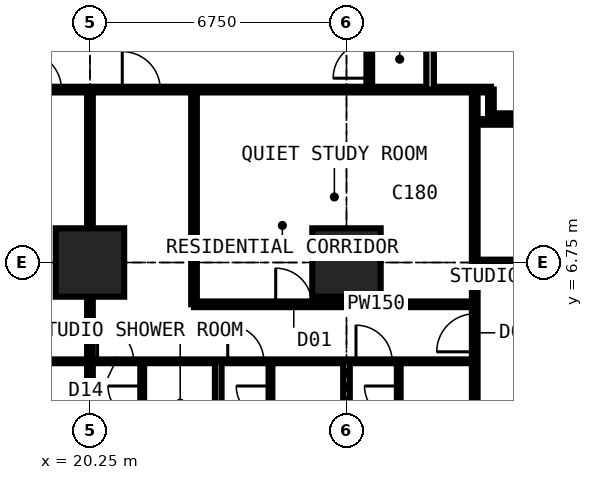
"""IFC4 building model, lengths in metres.
Left out: names, types, materials, properties, quantities, classifications, styles, units other than length and angle.
Written with IfcOpenShell. Run it as: python <this file> out.ifc"""

import sys

from ifc_helpers import new_model, si_unit, direction, frame, frame_2d, origin, origin_2d, place, context, subcontext, project, spatial, rectangle, extrude, element, fill, save


model = new_model("IFC4")
c1 = context("Model", 3, precision=1e-05, world=origin(), true_north=direction((0.0, 1.0)))
c2 = subcontext(c1, "Body", "Model", "MODEL_VIEW")
j1 = project(units=[si_unit("LENGTHUNIT", "METRE"), si_unit("PLANEANGLEUNIT", "RADIAN")], contexts=[c1])
p1 = place(None, origin())
s1 = spatial("IfcSite", under=j1, at=p1, CompositionType="ELEMENT")
p2 = place(p1, origin())
s2 = spatial("IfcBuilding", under=s1, at=p2, CompositionType="ELEMENT")
p3 = place(p2, frame((0.0, 0.0, 64.8)))
s3 = spatial("IfcBuildingStorey", under=s2, at=p3, CompositionType="ELEMENT", Elevation=64.8)
for number, where, z_axis, x_axis in (
    (1, (20.25, 6.75, 0.0), (0.0, 0.0, 1.0), (1.0, 0.0, 0.0)),
    (2, (27.0, 6.75, 0.0), (0.0, 0.0, 1.0), (1.0, 0.0, 0.0)),
):
    element("IfcColumn", number, at=place(p3, frame(where, z_axis=z_axis, x_axis=x_axis)), inside=s3, PredefinedType="COLUMN", context=c2, shape_type="SweptSolid", body=[
        extrude(rectangle(XDim=1.8, YDim=1.8, at=origin_2d()), origin(), (0.0, 0.0, 1.0), 3.6),
    ])
p4 = place(p3, frame((6.75, 4.15, 0.0), z_axis=(0.0, 0.0, 1.0), x_axis=(1.0, 0.0, 0.0)))
e3 = element("IfcWall", 3, at=p4, inside=s3, PredefinedType="PARTITIONING", context=c2, shape_type="SweptSolid", body=[
    extrude(rectangle(XDim=23.625, YDim=0.1, at=frame_2d((11.812, 0.0))), origin(), (0.0, 0.0, 1.0), 3.375),
])
p5 = place(p4, frame((1.2, 0.0, 0.0)))
e4 = element("IfcOpeningElement", 4, at=p5, cuts=e3, PredefinedType="OPENING", context=c2, shape_type="SweptSolid", body=[
    extrude(rectangle(XDim=1.0, YDim=2.2, at=frame_2d((0.5, 1.1))), frame((0.0, 0.06, 0.0), z_axis=(0.0, -1.0, 0.0), x_axis=(1.0, 0.0, 0.0)), (0.0, 0.0, 1.0), 0.12),
])
p6 = place(p4, frame((3.575, 0.0, 0.0)))
e5 = element("IfcOpeningElement", 5, at=p6, cuts=e3, PredefinedType="OPENING", context=c2, shape_type="SweptSolid", body=[
    extrude(rectangle(XDim=0.95, YDim=2.2, at=frame_2d((0.475, 1.1))), frame((0.0, 0.06, 0.0), z_axis=(0.0, -1.0, 0.0), x_axis=(1.0, 0.0, 0.0)), (0.0, 0.0, 1.0), 0.12),
])
p7 = place(p4, frame((7.0, 0.0, 0.0)))
e6 = element("IfcOpeningElement", 6, at=p7, cuts=e3, PredefinedType="OPENING", context=c2, shape_type="SweptSolid", body=[
    extrude(rectangle(XDim=0.95, YDim=2.2, at=frame_2d((0.475, 1.1))), frame((0.0, 0.06, 0.0), z_axis=(0.0, -1.0, 0.0), x_axis=(1.0, 0.0, 0.0)), (0.0, 0.0, 1.0), 0.12),
])
p8 = place(p4, frame((10.375, 0.0, 0.0)))
e7 = element("IfcOpeningElement", 7, at=p8, cuts=e3, PredefinedType="OPENING", context=c2, shape_type="SweptSolid", body=[
    extrude(rectangle(XDim=0.95, YDim=2.2, at=frame_2d((0.475, 1.1))), frame((0.0, 0.06, 0.0), z_axis=(0.0, -1.0, 0.0), x_axis=(1.0, 0.0, 0.0)), (0.0, 0.0, 1.0), 0.12),
])
p9 = place(p4, frame((13.7, 0.0, 0.0)))
e8 = element("IfcOpeningElement", 8, at=p9, cuts=e3, PredefinedType="OPENING", context=c2, shape_type="SweptSolid", body=[
    extrude(rectangle(XDim=0.95, YDim=2.2, at=frame_2d((0.475, 1.1))), frame((0.0, 0.06, 0.0), z_axis=(0.0, -1.0, 0.0), x_axis=(1.0, 0.0, 0.0)), (0.0, 0.0, 1.0), 0.12),
])
p10 = place(p4, frame((17.125, 0.0, 0.0)))
e9 = element("IfcOpeningElement", 9, at=p10, cuts=e3, PredefinedType="OPENING", context=c2, shape_type="SweptSolid", body=[
    extrude(rectangle(XDim=0.95, YDim=2.2, at=frame_2d((0.475, 1.1))), frame((0.0, 0.06, 0.0), z_axis=(0.0, -1.0, 0.0), x_axis=(1.0, 0.0, 0.0)), (0.0, 0.0, 1.0), 0.12),
])
p11 = place(p4, frame((20.5, 0.0, 0.0)))
e10 = element("IfcOpeningElement", 10, at=p11, cuts=e3, PredefinedType="OPENING", context=c2, shape_type="SweptSolid", body=[
    extrude(rectangle(XDim=0.95, YDim=2.2, at=frame_2d((0.475, 1.1))), frame((0.0, 0.06, 0.0), z_axis=(0.0, -1.0, 0.0), x_axis=(1.0, 0.0, 0.0)), (0.0, 0.0, 1.0), 0.12),
])
p12 = place(p3, frame((10.125, 11.3, 0.0), z_axis=(0.0, 0.0, 1.0), x_axis=(1.0, 0.0, 0.0)))
e11 = element("IfcWall", 11, at=p12, inside=s3, PredefinedType="PARTITIONING", context=c2, shape_type="SweptSolid", body=[
    extrude(rectangle(XDim=20.675, YDim=0.15, at=frame_2d((10.337, 0.0))), origin(), (0.0, 0.0, 1.0), 3.375),
])
p13 = place(p12, frame((8.375, 0.0, 0.0)))
e12 = element("IfcOpeningElement", 12, at=p13, cuts=e11, PredefinedType="OPENING", context=c2, shape_type="SweptSolid", body=[
    extrude(rectangle(XDim=1.0, YDim=2.2, at=frame_2d((0.5, 1.1))), frame((0.0, 0.085, 0.0), z_axis=(0.0, -1.0, 0.0), x_axis=(1.0, 0.0, 0.0)), (0.0, 0.0, 1.0), 0.17),
])
p14 = place(p12, frame((10.975, 0.0, 0.0)))
e13 = element("IfcOpeningElement", 13, at=p14, cuts=e11, PredefinedType="OPENING", context=c2, shape_type="SweptSolid", body=[
    extrude(rectangle(XDim=1.0, YDim=2.2, at=frame_2d((0.5, 1.1))), frame((0.0, 0.085, 0.0), z_axis=(0.0, -1.0, 0.0), x_axis=(1.0, 0.0, 0.0)), (0.0, 0.0, 1.0), 0.17),
])
p15 = place(p12, frame((3.925, 0.0, 0.0)))
e14 = element("IfcOpeningElement", 14, at=p15, cuts=e11, PredefinedType="OPENING", context=c2, shape_type="SweptSolid", body=[
    extrude(rectangle(XDim=0.95, YDim=2.2, at=frame_2d((0.475, 1.1))), frame((0.0, 0.085, 0.0), z_axis=(0.0, -1.0, 0.0), x_axis=(1.0, 0.0, 0.0)), (0.0, 0.0, 1.0), 0.17),
])
p16 = place(p3, frame((20.25, -0.734, 0.0), z_axis=(0.0, 0.0, 1.0), x_axis=(0.0, 1.0, 0.0)))
e15 = element("IfcWall", 15, at=p16, inside=s3, PredefinedType="PARTITIONING", context=c2, shape_type="SweptSolid", body=[
    extrude(rectangle(XDim=12.034, YDim=0.15, at=frame_2d((6.017, 0.0))), origin(), (0.0, 0.0, 1.0), 2.61),
])
p17 = place(p3, frame((21.625, 1.95, 0.0), z_axis=(0.0, 0.0, 1.0), x_axis=(0.0, 1.0, 0.0)))
e16 = element("IfcWall", 16, at=p17, inside=s3, PredefinedType="PARTITIONING", context=c2, shape_type="SweptSolid", body=[
    extrude(rectangle(XDim=2.2, YDim=0.1, at=frame_2d((1.1, 0.0))), origin(), (0.0, 0.0, 1.0), 3.375),
])
p18 = place(p17, frame((0.65, 0.0, 0.0)))
e17 = element("IfcOpeningElement", 17, at=p18, cuts=e16, PredefinedType="OPENING", context=c2, shape_type="SweptSolid", body=[
    extrude(rectangle(XDim=0.9, YDim=2.2, at=frame_2d((0.45, 1.1))), frame((0.0, 0.06, 0.0), z_axis=(0.0, -1.0, 0.0), x_axis=(1.0, 0.0, 0.0)), (0.0, 0.0, 1.0), 0.12),
])
p19 = place(p3, frame((22.988, 5.65, 0.0), z_axis=(0.0, 0.0, 1.0), x_axis=(1.0, 0.0, 0.0)))
e18 = element("IfcWall", 18, at=p19, inside=s3, PredefinedType="PARTITIONING", context=c2, shape_type="SweptSolid", body=[
    extrude(rectangle(XDim=7.387, YDim=0.15, at=frame_2d((3.694, 0.0))), origin(), (0.0, 0.0, 1.0), 3.375),
])
p20 = place(p19, frame((2.15, 0.0, 0.0)))
e19 = element("IfcOpeningElement", 19, at=p20, cuts=e18, PredefinedType="OPENING", context=c2, shape_type="SweptSolid", body=[
    extrude(rectangle(XDim=0.95, YDim=2.2, at=frame_2d((0.475, 1.1))), frame((0.0, 0.085, 0.0), z_axis=(0.0, -1.0, 0.0), x_axis=(1.0, 0.0, 0.0)), (0.0, 0.0, 1.0), 0.17),
])
p21 = place(p3, frame((22.988, 5.65, 0.0), z_axis=(0.0, 0.0, 1.0), x_axis=(0.0, 1.0, 0.0)))
e20 = element("IfcWall", 20, at=p21, inside=s3, PredefinedType="PARTITIONING", context=c2, shape_type="SweptSolid", body=[
    extrude(rectangle(XDim=5.65, YDim=0.15, at=frame_2d((2.825, 0.0))), origin(), (0.0, 0.0, 1.0), 3.375),
])
p22 = place(p3, frame((23.625, -0.734, 0.0), z_axis=(0.0, 0.0, 1.0), x_axis=(0.0, 1.0, 0.0)))
e21 = element("IfcWall", 21, at=p22, inside=s3, PredefinedType="PARTITIONING", context=c2, shape_type="SweptSolid", body=[
    extrude(rectangle(XDim=4.884, YDim=0.175, at=frame_2d((2.442, 0.0))), origin(), (0.0, 0.0, 1.0), 3.375),
])
p23 = place(p3, frame((25.0, 1.95, 0.0), z_axis=(0.0, 0.0, 1.0), x_axis=(0.0, 1.0, 0.0)))
e22 = element("IfcWall", 22, at=p23, inside=s3, PredefinedType="PARTITIONING", context=c2, shape_type="SweptSolid", body=[
    extrude(rectangle(XDim=2.2, YDim=0.1, at=frame_2d((1.1, 0.0))), origin(), (0.0, 0.0, 1.0), 3.375),
])
p24 = place(p23, frame((0.65, 0.0, 0.0)))
e23 = element("IfcOpeningElement", 23, at=p24, cuts=e22, PredefinedType="OPENING", context=c2, shape_type="SweptSolid", body=[
    extrude(rectangle(XDim=0.9, YDim=2.2, at=frame_2d((0.45, 1.1))), frame((0.0, 0.06, 0.0), z_axis=(0.0, -1.0, 0.0), x_axis=(1.0, 0.0, 0.0)), (0.0, 0.0, 1.0), 0.12),
])
p25 = place(p3, frame((27.0, -0.734, 0.0), z_axis=(0.0, 0.0, 1.0), x_axis=(0.0, 1.0, 0.0)))
e24 = element("IfcWall", 24, at=p25, inside=s3, PredefinedType="PARTITIONING", context=c2, shape_type="SweptSolid", body=[
    extrude(rectangle(XDim=4.884, YDim=0.175, at=frame_2d((2.442, 0.0))), origin(), (0.0, 0.0, 1.0), 2.877),
])
p26 = place(p3, frame((27.6, 11.3, 0.0), z_axis=(0.0, 0.0, 1.0), x_axis=(0.0, 1.0, 0.0)))
e25 = element("IfcWall", 25, at=p26, inside=s3, PredefinedType="PARTITIONING", context=c2, shape_type="SweptSolid", body=[
    extrude(rectangle(XDim=1.6, YDim=0.15, at=frame_2d((0.8, 0.0))), origin(), (0.0, 0.0, 1.0), 3.375),
])
p27 = place(p26, frame((0.3, 0.0, 0.0)))
e26 = element("IfcOpeningElement", 26, at=p27, cuts=e25, PredefinedType="OPENING", context=c2, shape_type="SweptSolid", body=[
    extrude(rectangle(XDim=0.95, YDim=2.2, at=frame_2d((0.475, 1.1))), frame((0.0, 0.085, 0.0), z_axis=(0.0, -1.0, 0.0), x_axis=(1.0, 0.0, 0.0)), (0.0, 0.0, 1.0), 0.17),
])
p28 = place(p3, frame((28.375, 1.95, 0.0), z_axis=(0.0, 0.0, 1.0), x_axis=(0.0, 1.0, 0.0)))
e27 = element("IfcWall", 27, at=p28, inside=s3, PredefinedType="PARTITIONING", context=c2, shape_type="SweptSolid", body=[
    extrude(rectangle(XDim=2.2, YDim=0.1, at=frame_2d((1.1, 0.0))), origin(), (0.0, 0.0, 1.0), 3.375),
])
p29 = place(p28, frame((0.65, 0.0, 0.0)))
e28 = element("IfcOpeningElement", 28, at=p29, cuts=e27, PredefinedType="OPENING", context=c2, shape_type="SweptSolid", body=[
    extrude(rectangle(XDim=0.9, YDim=2.2, at=frame_2d((0.45, 1.1))), frame((0.0, 0.06, 0.0), z_axis=(0.0, -1.0, 0.0), x_axis=(1.0, 0.0, 0.0)), (0.0, 0.0, 1.0), 0.12),
])
p30 = place(p3, frame((29.2, 11.3, 0.0), z_axis=(0.0, 0.0, 1.0), x_axis=(0.0, 1.0, 0.0)))
e29 = element("IfcWall", 29, at=p30, inside=s3, PredefinedType="PARTITIONING", context=c2, shape_type="SweptSolid", body=[
    extrude(rectangle(XDim=17.9, YDim=0.2, at=frame_2d((8.95, 0.0))), origin(), (0.0, 0.0, 1.0), 3.375),
])
p31 = place(p30, frame((8.35, 0.0, 0.0)))
e30 = element("IfcOpeningElement", 30, at=p31, cuts=e29, PredefinedType="OPENING", context=c2, shape_type="SweptSolid", body=[
    extrude(rectangle(XDim=1.2, YDim=2.2, at=frame_2d((0.6, 1.1))), frame((0.0, 0.11, 0.0), z_axis=(0.0, -1.0, 0.0), x_axis=(1.0, 0.0, 0.0)), (0.0, 0.0, 1.0), 0.22),
])
p32 = place(p3, frame((30.375, -0.734, 0.0), z_axis=(0.0, 0.0, 1.0), x_axis=(0.0, 1.0, 0.0)))
e31 = element("IfcWall", 31, at=p32, inside=s3, PredefinedType="PARTITIONING", context=c2, shape_type="SweptSolid", body=[
    extrude(rectangle(XDim=12.034, YDim=0.15, at=frame_2d((6.017, 0.0))), origin(), (0.0, 0.0, 1.0), 3.375),
])
p33 = place(p32, frame((5.134, 0.0, 0.0)))
e32 = element("IfcOpeningElement", 32, at=p33, cuts=e31, PredefinedType="OPENING", context=c2, shape_type="SweptSolid", body=[
    extrude(rectangle(XDim=1.0, YDim=2.2, at=frame_2d((0.5, 1.1))), frame((0.0, 0.085, 0.0), z_axis=(0.0, -1.0, 0.0), x_axis=(1.0, 0.0, 0.0)), (0.0, 0.0, 1.0), 0.17),
])
p34 = place(p3, frame((30.375, 6.75, 0.0), z_axis=(0.0, 0.0, 1.0), x_axis=(1.0, 0.0, 0.0)))
e33 = element("IfcWall", 33, at=p34, inside=s3, PredefinedType="PARTITIONING", context=c2, shape_type="SweptSolid", body=[
    extrude(rectangle(XDim=5.975, YDim=0.15, at=frame_2d((2.988, 0.0))), origin(), (0.0, 0.0, 1.0), 2.877),
])
p35 = place(p3, frame((30.375, 10.45, 0.0), z_axis=(0.0, 0.0, 1.0), x_axis=(1.0, 0.0, 0.0)))
e34 = element("IfcWall", 34, at=p35, inside=s3, PredefinedType="PARTITIONING", context=c2, shape_type="SweptSolid", body=[
    extrude(rectangle(XDim=4.475, YDim=0.15, at=frame_2d((2.238, 0.0))), origin(), (0.0, 0.0, 1.0), 3.375),
])
p36 = place(p35, frame((2.35, 0.0, 0.0)))
e35 = element("IfcOpeningElement", 35, at=p36, cuts=e34, PredefinedType="OPENING", context=c2, shape_type="SweptSolid", body=[
    extrude(rectangle(XDim=0.95, YDim=2.2, at=frame_2d((0.475, 1.1))), frame((0.0, 0.085, 0.0), z_axis=(0.0, -1.0, 0.0), x_axis=(1.0, 0.0, 0.0)), (0.0, 0.0, 1.0), 0.17),
])
p37 = place(p3, frame((30.8, 10.6, 0.0), z_axis=(0.0, 0.0, 1.0), x_axis=(0.0, 1.0, 0.0)))
e36 = element("IfcWall", 36, at=p37, inside=s3, PredefinedType="PARTITIONING", context=c2, shape_type="SweptSolid", body=[
    extrude(rectangle(XDim=0.7, YDim=0.15, at=frame_2d((0.35, 0.0))), origin(), (0.0, 0.0, 1.0), 3.375),
])
p38 = place(p3, frame((30.8, 10.6, 0.0), z_axis=(0.0, 0.0, 1.0), x_axis=(1.0, 0.0, 0.0)))
e37 = element("IfcWall", 37, at=p38, inside=s3, PredefinedType="PARTITIONING", context=c2, shape_type="SweptSolid", body=[
    extrude(rectangle(XDim=1.85, YDim=0.15, at=frame_2d((0.925, 0.0))), origin(), (0.0, 0.0, 1.0), 3.375),
])
p39 = place(p27, origin())
e38 = element("IfcDoor", 38, at=p39, inside=s3, OperationType="SINGLE_SWING_LEFT", PredefinedType="DOOR", context=c2, shape_type="SweptSolid", body=[
    extrude(rectangle(XDim=0.95, YDim=2.2, at=frame_2d((0.475, 1.1))), frame((0.0, 0.025, 0.0), z_axis=(0.0, -1.0, 0.0), x_axis=(1.0, 0.0, 0.0)), (0.0, 0.0, 1.0), 0.05),
])
fill(e26, e38)
p40 = place(p13, origin())
e39 = element("IfcDoor", 39, at=p40, inside=s3, OperationType="SINGLE_SWING_LEFT", PredefinedType="DOOR", context=c2, shape_type="SweptSolid", body=[
    extrude(rectangle(XDim=1.0, YDim=2.2, at=frame_2d((0.5, 1.1))), frame((0.0, 0.025, 0.0), z_axis=(0.0, -1.0, 0.0), x_axis=(1.0, 0.0, 0.0)), (0.0, 0.0, 1.0), 0.05),
])
fill(e12, e39)
p41 = place(p9, origin())
e40 = element("IfcDoor", 40, at=p41, inside=s3, OperationType="SINGLE_SWING_LEFT", PredefinedType="DOOR", context=c2, shape_type="SweptSolid", body=[
    extrude(rectangle(XDim=0.95, YDim=2.2, at=frame_2d((0.475, 1.1))), frame((0.0, 0.025, 0.0), z_axis=(0.0, -1.0, 0.0), x_axis=(1.0, 0.0, 0.0)), (0.0, 0.0, 1.0), 0.05),
])
fill(e8, e40)
p42 = place(p18, origin())
e41 = element("IfcDoor", 41, at=p42, inside=s3, OperationType="SINGLE_SWING_RIGHT", PredefinedType="DOOR", context=c2, shape_type="SweptSolid", body=[
    extrude(rectangle(XDim=0.9, YDim=2.2, at=frame_2d((0.45, 1.1))), frame((0.0, 0.025, 0.0), z_axis=(0.0, -1.0, 0.0), x_axis=(1.0, 0.0, 0.0)), (0.0, 0.0, 1.0), 0.05),
])
fill(e17, e41)
p43 = place(p10, origin())
e42 = element("IfcDoor", 42, at=p43, inside=s3, OperationType="SINGLE_SWING_LEFT", PredefinedType="DOOR", context=c2, shape_type="SweptSolid", body=[
    extrude(rectangle(XDim=0.95, YDim=2.2, at=frame_2d((0.475, 1.1))), frame((0.0, 0.025, 0.0), z_axis=(0.0, -1.0, 0.0), x_axis=(1.0, 0.0, 0.0)), (0.0, 0.0, 1.0), 0.05),
])
fill(e9, e42)
p44 = place(p24, origin())
e43 = element("IfcDoor", 43, at=p44, inside=s3, OperationType="SINGLE_SWING_RIGHT", PredefinedType="DOOR", context=c2, shape_type="SweptSolid", body=[
    extrude(rectangle(XDim=0.9, YDim=2.2, at=frame_2d((0.45, 1.1))), frame((0.0, 0.025, 0.0), z_axis=(0.0, -1.0, 0.0), x_axis=(1.0, 0.0, 0.0)), (0.0, 0.0, 1.0), 0.05),
])
fill(e23, e43)
p45 = place(p11, origin())
e44 = element("IfcDoor", 44, at=p45, inside=s3, OperationType="SINGLE_SWING_LEFT", PredefinedType="DOOR", context=c2, shape_type="SweptSolid", body=[
    extrude(rectangle(XDim=0.95, YDim=2.2, at=frame_2d((0.475, 1.1))), frame((0.0, 0.025, 0.0), z_axis=(0.0, -1.0, 0.0), x_axis=(1.0, 0.0, 0.0)), (0.0, 0.0, 1.0), 0.05),
])
fill(e10, e44)
p46 = place(p29, origin())
e45 = element("IfcDoor", 45, at=p46, inside=s3, OperationType="SINGLE_SWING_RIGHT", PredefinedType="DOOR", context=c2, shape_type="SweptSolid", body=[
    extrude(rectangle(XDim=0.9, YDim=2.2, at=frame_2d((0.45, 1.1))), frame((0.0, 0.025, 0.0), z_axis=(0.0, -1.0, 0.0), x_axis=(1.0, 0.0, 0.0)), (0.0, 0.0, 1.0), 0.05),
])
fill(e28, e45)
p47 = place(p14, origin())
e46 = element("IfcDoor", 46, at=p47, inside=s3, OperationType="SINGLE_SWING_LEFT", PredefinedType="DOOR", context=c2, shape_type="SweptSolid", body=[
    extrude(rectangle(XDim=1.0, YDim=2.2, at=frame_2d((0.5, 1.1))), frame((0.0, 0.025, 0.0), z_axis=(0.0, -1.0, 0.0), x_axis=(1.0, 0.0, 0.0)), (0.0, 0.0, 1.0), 0.05),
])
fill(e13, e46)
p48 = place(p20, origin())
e47 = element("IfcDoor", 47, at=p48, inside=s3, OperationType="SINGLE_SWING_LEFT", PredefinedType="DOOR", context=c2, shape_type="SweptSolid", body=[
    extrude(rectangle(XDim=0.95, YDim=2.2, at=frame_2d((0.475, 1.1))), frame((0.0, 0.025, 0.0), z_axis=(0.0, -1.0, 0.0), x_axis=(1.0, 0.0, 0.0)), (0.0, 0.0, 1.0), 0.05),
])
fill(e19, e47)
p49 = place(p33, origin())
e48 = element("IfcDoor", 48, at=p49, inside=s3, OperationType="SINGLE_SWING_LEFT", PredefinedType="DOOR", context=c2, shape_type="SweptSolid", body=[
    extrude(rectangle(XDim=1.0, YDim=2.2, at=frame_2d((0.5, 1.1))), frame((0.0, 0.025, 0.0), z_axis=(0.0, -1.0, 0.0), x_axis=(1.0, 0.0, 0.0)), (0.0, 0.0, 1.0), 0.05),
])
fill(e32, e48)
save(model, sys.argv[1])
